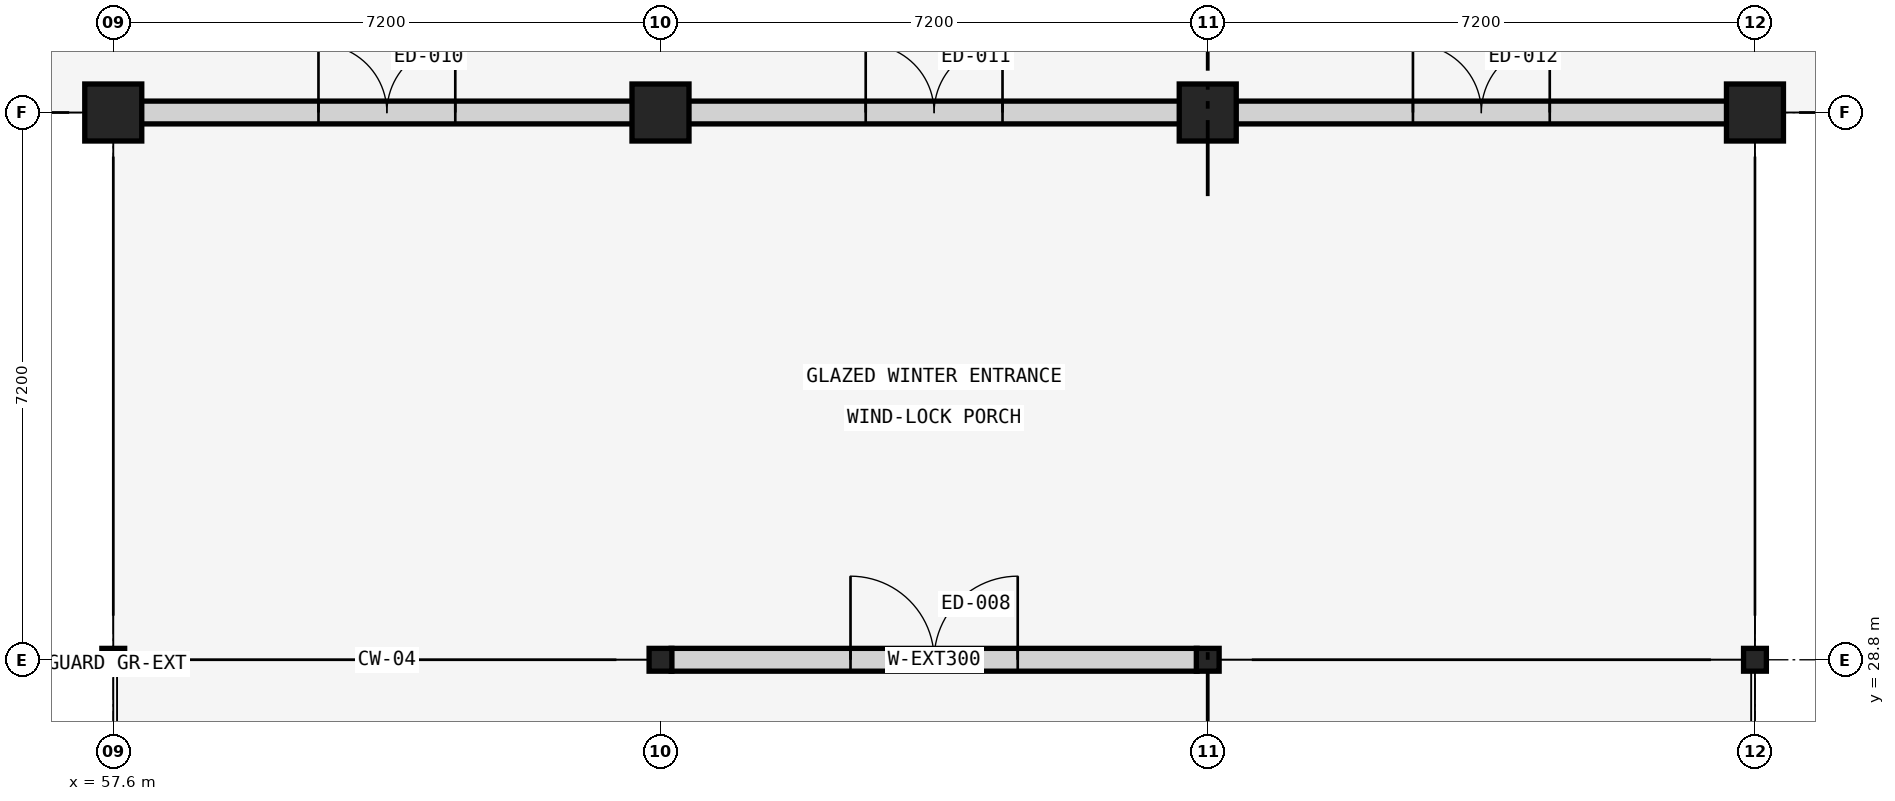
"""IFC4 building model, lengths in metres.
Left out: names, types, materials, properties, quantities, classifications, styles, units other than length and angle.
Written with IfcOpenShell. Run it as: python <this file> out.ifc"""

import sys

from ifc_helpers import new_model, si_unit, direction, frame, frame_2d, origin, origin_2d, place, context, subcontext, project, spatial, rectangle, circle, i_section, extrude, element, fill, save


model = new_model("IFC4")
c1 = context("Model", 3, precision=1e-05, world=origin(), true_north=direction((0.0, 1.0)))
c2 = subcontext(c1, "Body", "Model", "MODEL_VIEW")
j1 = project(units=[si_unit("LENGTHUNIT", "METRE"), si_unit("PLANEANGLEUNIT", "RADIAN")], contexts=[c1])
p1 = place(None, origin())
s1 = spatial("IfcSite", under=j1, at=p1, CompositionType="ELEMENT")
p2 = place(p1, origin())
s2 = spatial("IfcBuilding", under=s1, at=p2, CompositionType="ELEMENT")
p3 = place(p2, origin())
s3 = spatial("IfcBuildingStorey", under=s2, at=p3, CompositionType="ELEMENT", Elevation=0.0)
p4 = place(p3, frame((57.6, 28.8, 0.0), z_axis=(0.0, 0.0, 1.0), x_axis=(1.0, 0.0, 0.0)))
e1 = element("IfcColumn", 1, at=p4, inside=s3, PredefinedType="COLUMN", context=c2, shape_type="SweptSolid", body=[
    extrude(i_section(OverallWidth=0.3, OverallDepth=0.3, WebThickness=0.011, FlangeThickness=0.019, FilletRadius=0.027, at=origin_2d()), origin(), (0.0, 0.0, 1.0), 4.8),
])
p5 = place(p3, frame((57.6, 36.0, 0.0), z_axis=(0.0, 0.0, 1.0), x_axis=(1.0, 0.0, 0.0)))
e2 = element("IfcColumn", 2, at=p5, inside=s3, PredefinedType="COLUMN", context=c2, shape_type="SweptSolid", body=[
    extrude(circle(Radius=0.375, at=origin_2d()), origin(), (0.0, 0.0, 1.0), 4.8),
])
p6 = place(p3, frame((64.8, 28.8, 0.0), z_axis=(0.0, 0.0, 1.0), x_axis=(1.0, 0.0, 0.0)))
e3 = element("IfcColumn", 3, at=p6, inside=s3, PredefinedType="COLUMN", context=c2, shape_type="SweptSolid", body=[
    extrude(i_section(OverallWidth=0.3, OverallDepth=0.3, WebThickness=0.011, FlangeThickness=0.019, FilletRadius=0.027, at=origin_2d()), origin(), (0.0, 0.0, 1.0), 4.8),
])
p7 = place(p3, frame((64.8, 36.0, 0.0), z_axis=(0.0, 0.0, 1.0), x_axis=(1.0, 0.0, 0.0)))
e4 = element("IfcColumn", 4, at=p7, inside=s3, PredefinedType="COLUMN", context=c2, shape_type="SweptSolid", body=[
    extrude(circle(Radius=0.375, at=origin_2d()), origin(), (0.0, 0.0, 1.0), 4.8),
])
p8 = place(p3, frame((72.0, 28.8, 0.0), z_axis=(0.0, 0.0, 1.0), x_axis=(1.0, 0.0, 0.0)))
e5 = element("IfcColumn", 5, at=p8, inside=s3, PredefinedType="COLUMN", context=c2, shape_type="SweptSolid", body=[
    extrude(i_section(OverallWidth=0.3, OverallDepth=0.3, WebThickness=0.011, FlangeThickness=0.019, FilletRadius=0.027, at=origin_2d()), origin(), (0.0, 0.0, 1.0), 4.8),
])
p9 = place(p3, frame((72.0, 36.0, 0.0), z_axis=(0.0, 0.0, 1.0), x_axis=(1.0, 0.0, 0.0)))
e6 = element("IfcColumn", 6, at=p9, inside=s3, PredefinedType="COLUMN", context=c2, shape_type="SweptSolid", body=[
    extrude(circle(Radius=0.375, at=origin_2d()), origin(), (0.0, 0.0, 1.0), 4.8),
])
p10 = place(p3, frame((79.2, 28.8, 0.0), z_axis=(0.0, 0.0, 1.0), x_axis=(1.0, 0.0, 0.0)))
e7 = element("IfcColumn", 7, at=p10, inside=s3, PredefinedType="COLUMN", context=c2, shape_type="SweptSolid", body=[
    extrude(i_section(OverallWidth=0.3, OverallDepth=0.3, WebThickness=0.011, FlangeThickness=0.019, FilletRadius=0.027, at=origin_2d()), origin(), (0.0, 0.0, 1.0), 4.8),
])
p11 = place(p3, frame((79.2, 36.0, 0.0), z_axis=(0.0, 0.0, 1.0), x_axis=(1.0, 0.0, 0.0)))
e8 = element("IfcColumn", 8, at=p11, inside=s3, PredefinedType="COLUMN", context=c2, shape_type="SweptSolid", body=[
    extrude(circle(Radius=0.375, at=origin_2d()), origin(), (0.0, 0.0, 1.0), 4.8),
])
p12 = place(p3, frame((64.94, 28.8, 0.0), z_axis=(0.0, 0.0, 1.0), x_axis=(1.0, 0.0, 0.0)))
e9 = element("IfcWall", 9, at=p12, inside=s3, PredefinedType="SOLIDWALL", context=c2, shape_type="SweptSolid", body=[
    extrude(rectangle(XDim=6.92, YDim=0.3, at=frame_2d((3.46, 0.0))), origin(), (0.0, 0.0, 1.0), 4.55),
])
p13 = place(p12, frame((2.36, 0.0, 0.0)))
e10 = element("IfcOpeningElement", 10, at=p13, cuts=e9, PredefinedType="OPENING", context=c2, shape_type="SweptSolid", body=[
    extrude(rectangle(XDim=2.2, YDim=2.5, at=frame_2d((1.1, 1.25))), frame((0.0, 0.16, 0.0), z_axis=(0.0, -1.0, 0.0), x_axis=(1.0, 0.0, 0.0)), (0.0, 0.0, 1.0), 0.32),
])
p14 = place(p3, frame((57.965, 36.0, 0.0), z_axis=(0.0, 0.0, 1.0), x_axis=(1.0, 0.0, 0.0)))
e11 = element("IfcWall", 11, at=p14, inside=s3, PredefinedType="SOLIDWALL", context=c2, shape_type="SweptSolid", body=[
    extrude(rectangle(XDim=6.47, YDim=0.3, at=frame_2d((3.235, 0.0))), origin(), (0.0, 0.0, 1.0), 3.85),
])
p15 = place(p14, frame((2.335, 0.0, 0.0)))
e12 = element("IfcOpeningElement", 12, at=p15, cuts=e11, PredefinedType="OPENING", context=c2, shape_type="SweptSolid", body=[
    extrude(rectangle(XDim=1.8, YDim=2.4, at=frame_2d((0.9, 1.2))), frame((0.0, 0.16, 0.0), z_axis=(0.0, -1.0, 0.0), x_axis=(1.0, 0.0, 0.0)), (0.0, 0.0, 1.0), 0.32),
])
p16 = place(p3, frame((65.165, 36.0, 0.0), z_axis=(0.0, 0.0, 1.0), x_axis=(1.0, 0.0, 0.0)))
e13 = element("IfcWall", 13, at=p16, inside=s3, PredefinedType="SOLIDWALL", context=c2, shape_type="SweptSolid", body=[
    extrude(rectangle(XDim=6.47, YDim=0.3, at=frame_2d((3.235, 0.0))), origin(), (0.0, 0.0, 1.0), 3.85),
])
p17 = place(p16, frame((2.335, 0.0, 0.0)))
e14 = element("IfcOpeningElement", 14, at=p17, cuts=e13, PredefinedType="OPENING", context=c2, shape_type="SweptSolid", body=[
    extrude(rectangle(XDim=1.8, YDim=2.4, at=frame_2d((0.9, 1.2))), frame((0.0, 0.16, 0.0), z_axis=(0.0, -1.0, 0.0), x_axis=(1.0, 0.0, 0.0)), (0.0, 0.0, 1.0), 0.32),
])
p18 = place(p3, frame((72.365, 36.0, 0.0), z_axis=(0.0, 0.0, 1.0), x_axis=(1.0, 0.0, 0.0)))
e15 = element("IfcWall", 15, at=p18, inside=s3, PredefinedType="SOLIDWALL", context=c2, shape_type="SweptSolid", body=[
    extrude(rectangle(XDim=6.47, YDim=0.3, at=frame_2d((3.235, 0.0))), origin(), (0.0, 0.0, 1.0), 3.85),
])
p19 = place(p18, frame((2.335, 0.0, 0.0)))
e16 = element("IfcOpeningElement", 16, at=p19, cuts=e15, PredefinedType="OPENING", context=c2, shape_type="SweptSolid", body=[
    extrude(rectangle(XDim=1.8, YDim=2.4, at=frame_2d((0.9, 1.2))), frame((0.0, 0.16, 0.0), z_axis=(0.0, -1.0, 0.0), x_axis=(1.0, 0.0, 0.0)), (0.0, 0.0, 1.0), 0.32),
])
p20 = place(p13, frame((2.2, 0.0, 0.0), z_axis=(0.0, 0.0, 1.0), x_axis=(-1.0, 0.0, 0.0)))
e17 = element("IfcDoor", 17, at=p20, inside=s3, OperationType="DOUBLE_DOOR_SINGLE_SWING", PredefinedType="DOOR", context=c2, shape_type="SweptSolid", body=[
    extrude(rectangle(XDim=2.2, YDim=2.5, at=frame_2d((1.1, 1.25))), frame((0.0, 0.025, 0.0), z_axis=(0.0, -1.0, 0.0), x_axis=(1.0, 0.0, 0.0)), (0.0, 0.0, 1.0), 0.05),
])
fill(e10, e17)
p21 = place(p15, frame((1.8, 0.0, 0.0), z_axis=(0.0, 0.0, 1.0), x_axis=(-1.0, 0.0, 0.0)))
e18 = element("IfcDoor", 18, at=p21, inside=s3, OperationType="DOUBLE_DOOR_SINGLE_SWING", PredefinedType="DOOR", context=c2, shape_type="SweptSolid", body=[
    extrude(rectangle(XDim=1.8, YDim=2.4, at=frame_2d((0.9, 1.2))), frame((0.0, 0.025, 0.0), z_axis=(0.0, -1.0, 0.0), x_axis=(1.0, 0.0, 0.0)), (0.0, 0.0, 1.0), 0.05),
])
fill(e12, e18)
p22 = place(p17, frame((1.8, 0.0, 0.0), z_axis=(0.0, 0.0, 1.0), x_axis=(-1.0, 0.0, 0.0)))
e19 = element("IfcDoor", 19, at=p22, inside=s3, OperationType="DOUBLE_DOOR_SINGLE_SWING", PredefinedType="DOOR", context=c2, shape_type="SweptSolid", body=[
    extrude(rectangle(XDim=1.8, YDim=2.4, at=frame_2d((0.9, 1.2))), frame((0.0, 0.025, 0.0), z_axis=(0.0, -1.0, 0.0), x_axis=(1.0, 0.0, 0.0)), (0.0, 0.0, 1.0), 0.05),
])
fill(e14, e19)
p23 = place(p19, frame((1.8, 0.0, 0.0), z_axis=(0.0, 0.0, 1.0), x_axis=(-1.0, 0.0, 0.0)))
e20 = element("IfcDoor", 20, at=p23, inside=s3, OperationType="DOUBLE_DOOR_SINGLE_SWING", PredefinedType="DOOR", context=c2, shape_type="SweptSolid", body=[
    extrude(rectangle(XDim=1.8, YDim=2.4, at=frame_2d((0.9, 1.2))), frame((0.0, 0.025, 0.0), z_axis=(0.0, -1.0, 0.0), x_axis=(1.0, 0.0, 0.0)), (0.0, 0.0, 1.0), 0.05),
])
fill(e16, e20)
save(model, sys.argv[1])
